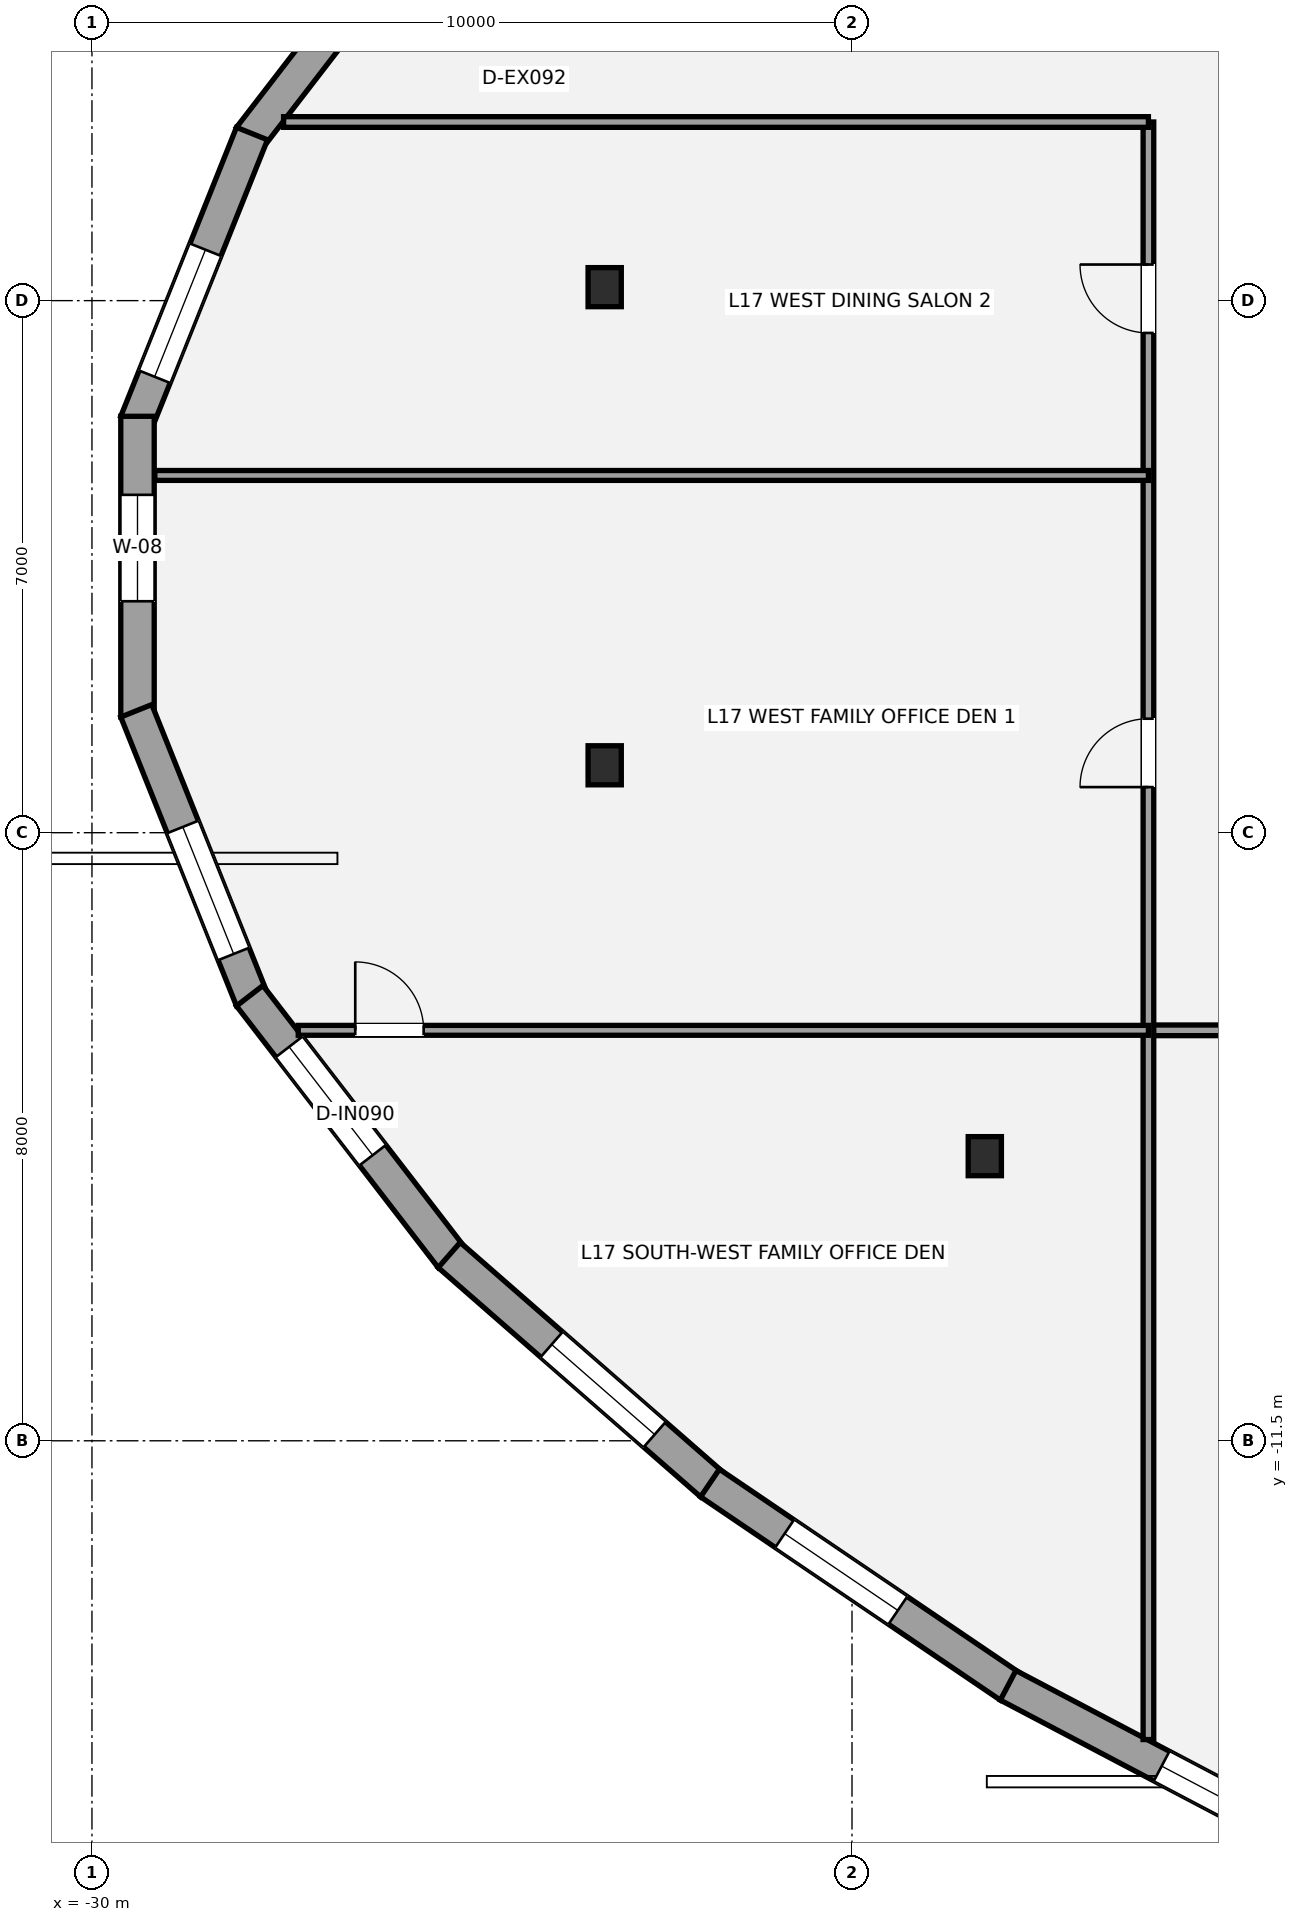
"""IFC4 building model, lengths in metres.
Left out: names, types, materials, properties, quantities, classifications, styles, units other than length and angle.
Written with IfcOpenShell. Run it as: python <this file> out.ifc"""

import sys

from ifc_helpers import new_model, si_unit, direction, frame, frame_2d, origin, origin_2d, place, context, subcontext, project, spatial, rectangle, i_section, extrude, element, fill, save


model = new_model("IFC4")
c1 = context("Model", 3, precision=1e-05, world=origin(), true_north=direction((0.0, 1.0)))
c2 = subcontext(c1, "Body", "Model", "MODEL_VIEW")
j1 = project(units=[si_unit("LENGTHUNIT", "METRE"), si_unit("PLANEANGLEUNIT", "RADIAN")], contexts=[c1])
p1 = place(None, origin())
s1 = spatial("IfcSite", under=j1, at=p1, CompositionType="ELEMENT")
p2 = place(p1, origin())
s2 = spatial("IfcBuilding", under=s1, at=p2, CompositionType="ELEMENT")
p3 = place(p2, frame((0.0, 0.0, 66.6)))
s3 = spatial("IfcBuildingStorey", under=s2, at=p3, CompositionType="ELEMENT", Elevation=66.6)
for number, where, z_axis, x_axis in (
    (1, (-23.254, 3.677, 0.0), (0.0, 0.0, 1.0), (1.0, 0.0, 0.0)),
    (2, (-23.254, -2.613, 0.0), (0.0, 0.0, 1.0), (1.0, 0.0, 0.0)),
    (3, (-18.253, -7.756, 0.0), (0.0, 0.0, 1.0), (1.0, 0.0, 0.0)),
):
    element("IfcColumn", number, at=place(p3, frame(where, z_axis=z_axis, x_axis=x_axis)), inside=s3, PredefinedType="COLUMN", context=c2, shape_type="SweptSolid", body=[
        extrude(i_section(OverallWidth=0.437, OverallDepth=0.514, WebThickness=0.061, FlangeThickness=0.097, at=origin_2d()), origin(), (0.0, 0.0, 1.0), 3.6),
    ])
p4 = place(p3, frame((-27.925, 5.645, 0.0), z_axis=(0.0, 0.0, 1.0), x_axis=(0.610684735824, 0.791873824187, 0.0)))
e4 = element("IfcWall", 4, at=p4, inside=s3, PredefinedType="STANDARD", context=c2, shape_type="SweptSolid", body=[
    extrude(rectangle(XDim=4.347, YDim=0.44, at=frame_2d((2.173, 0.0))), origin(), (0.0, 0.0, 1.0), 2.529),
])
p5 = place(p4, frame((2.647, 0.0, 0.65)))
e5 = element("IfcOpeningElement", 5, at=p5, cuts=e4, PredefinedType="OPENING", context=c2, shape_type="SweptSolid", body=[
    extrude(rectangle(XDim=1.5, YDim=1.7, at=frame_2d((0.75, 0.85))), frame((0.0, 0.23, 0.0), z_axis=(0.0, -1.0, 0.0), x_axis=(1.0, 0.0, 0.0)), (0.0, 0.0, 1.0), 0.46),
])
p6 = place(p3, frame((-29.417, 1.896, 0.0), z_axis=(0.0, 0.0, 1.0), x_axis=(0.37175044344, 0.928332703185, 0.0)))
e6 = element("IfcWall", 6, at=p6, inside=s3, PredefinedType="STANDARD", context=c2, shape_type="SweptSolid", body=[
    extrude(rectangle(XDim=4.095, YDim=0.44, at=frame_2d((2.047, 0.0))), origin(), (0.0, 0.0, 1.0), 2.529),
])
p7 = place(p6, frame((0.649, 0.0, 0.65)))
e7 = element("IfcOpeningElement", 7, at=p7, cuts=e6, PredefinedType="OPENING", context=c2, shape_type="SweptSolid", body=[
    extrude(rectangle(XDim=1.8, YDim=1.7, at=frame_2d((0.9, 0.85))), frame((0.0, 0.23, 0.0), z_axis=(0.0, -1.0, 0.0), x_axis=(1.0, 0.0, 0.0)), (0.0, 0.0, 1.0), 0.46),
])
p8 = place(p3, frame((-29.401, -1.978, 0.0), z_axis=(0.0, 0.0, 1.0), x_axis=(0.0, 1.0, 0.0)))
e8 = element("IfcWall", 8, at=p8, inside=s3, PredefinedType="STANDARD", context=c2, shape_type="SweptSolid", body=[
    extrude(rectangle(XDim=3.957, YDim=0.44, at=frame_2d((1.978, 0.0))), origin(), (0.0, 0.0, 1.0), 2.533),
])
p9 = place(p8, frame((1.523, 0.0, 0.85)))
e9 = element("IfcOpeningElement", 9, at=p9, cuts=e8, PredefinedType="OPENING", context=c2, shape_type="SweptSolid", body=[
    extrude(rectangle(XDim=1.4, YDim=1.55, at=frame_2d((0.7, 0.775))), frame((0.0, 0.23, 0.0), z_axis=(0.0, -1.0, 0.0), x_axis=(1.0, 0.0, 0.0)), (0.0, 0.0, 1.0), 0.46),
])
p10 = place(p3, frame((-27.895, -5.698, 0.0), z_axis=(0.0, 0.0, 1.0), x_axis=(-0.37175044344, 0.928332703185, 0.0)))
e10 = element("IfcWall", 10, at=p10, inside=s3, PredefinedType="STANDARD", context=c2, shape_type="SweptSolid", body=[
    extrude(rectangle(XDim=4.095, YDim=0.44, at=frame_2d((2.047, 0.0))), origin(), (0.0, 0.0, 1.0), 2.529),
])
p11 = place(p10, frame((0.649, 0.0, 0.65)))
e11 = element("IfcOpeningElement", 11, at=p11, cuts=e10, PredefinedType="OPENING", context=c2, shape_type="SweptSolid", body=[
    extrude(rectangle(XDim=1.8, YDim=1.7, at=frame_2d((0.9, 0.85))), frame((0.0, 0.23, 0.0), z_axis=(0.0, -1.0, 0.0), x_axis=(1.0, 0.0, 0.0)), (0.0, 0.0, 1.0), 0.46),
])
p12 = place(p3, frame((-25.27, -9.087, 0.0), z_axis=(0.0, 0.0, 1.0), x_axis=(-0.610684735824, 0.791873824187, 0.0)))
e12 = element("IfcWall", 12, at=p12, inside=s3, PredefinedType="STANDARD", context=c2, shape_type="SweptSolid", body=[
    extrude(rectangle(XDim=4.347, YDim=0.44, at=frame_2d((2.173, 0.0))), origin(), (0.0, 0.0, 1.0), 2.529),
])
p13 = place(p12, frame((1.698, 0.0, 0.65)))
e13 = element("IfcOpeningElement", 13, at=p13, cuts=e12, PredefinedType="OPENING", context=c2, shape_type="SweptSolid", body=[
    extrude(rectangle(XDim=1.8, YDim=1.7, at=frame_2d((0.9, 0.85))), frame((0.0, 0.23, 0.0), z_axis=(0.0, -1.0, 0.0), x_axis=(1.0, 0.0, 0.0)), (0.0, 0.0, 1.0), 0.46),
])
p14 = place(p3, frame((-21.847, -12.072, 0.0), z_axis=(0.0, 0.0, 1.0), x_axis=(-0.753064762529, 0.657946398605, 0.0)))
e14 = element("IfcWall", 14, at=p14, inside=s3, PredefinedType="STANDARD", context=c2, shape_type="SweptSolid", body=[
    extrude(rectangle(XDim=4.584, YDim=0.44, at=frame_2d((2.292, 0.0))), origin(), (0.0, 0.0, 1.0), 2.529),
])
p15 = place(p14, frame((0.995, 0.0, 0.65)))
e15 = element("IfcOpeningElement", 15, at=p15, cuts=e14, PredefinedType="OPENING", context=c2, shape_type="SweptSolid", body=[
    extrude(rectangle(XDim=1.8, YDim=1.7, at=frame_2d((0.9, 0.85))), frame((0.0, 0.23, 0.0), z_axis=(0.0, -1.0, 0.0), x_axis=(1.0, 0.0, 0.0)), (0.0, 0.0, 1.0), 0.46),
])
p16 = place(p3, frame((-17.925, -14.729, 0.0), z_axis=(0.0, 0.0, 1.0), x_axis=(-0.827689135004, 0.561186863528, 0.0)))
e16 = element("IfcWall", 16, at=p16, inside=s3, PredefinedType="STANDARD", context=c2, shape_type="SweptSolid", body=[
    extrude(rectangle(XDim=4.765, YDim=0.44, at=frame_2d((2.382, 0.0))), origin(), (0.0, 0.0, 1.0), 2.529),
])
p17 = place(p16, frame((1.778, 0.0, 0.65)))
e17 = element("IfcOpeningElement", 17, at=p17, cuts=e16, PredefinedType="OPENING", context=c2, shape_type="SweptSolid", body=[
    extrude(rectangle(XDim=1.8, YDim=1.7, at=frame_2d((0.9, 0.85))), frame((0.0, 0.23, 0.0), z_axis=(0.0, -1.0, 0.0), x_axis=(1.0, 0.0, 0.0)), (0.0, 0.0, 1.0), 0.46),
])
p18 = place(p3, frame((-13.498, -17.058, 0.0), z_axis=(0.0, 0.0, 1.0), x_axis=(-0.884937186938, 0.465710398395, 0.0)))
e18 = element("IfcWall", 18, at=p18, inside=s3, PredefinedType="STANDARD", context=c2, shape_type="SweptSolid", body=[
    extrude(rectangle(XDim=5.026, YDim=0.44, at=frame_2d((2.513, 0.0))), origin(), (0.0, 0.0, 1.0), 2.529),
])
p19 = place(p18, frame((0.944, 0.0, 0.65)))
e19 = element("IfcOpeningElement", 19, at=p19, cuts=e18, PredefinedType="OPENING", context=c2, shape_type="SweptSolid", body=[
    extrude(rectangle(XDim=1.8, YDim=1.7, at=frame_2d((0.9, 0.85))), frame((0.0, 0.23, 0.0), z_axis=(0.0, -1.0, 0.0), x_axis=(1.0, 0.0, 0.0)), (0.0, 0.0, 1.0), 0.46),
])
p20 = place(p3, frame((-16.1, -6.1, 0.0), z_axis=(0.0, 0.0, 1.0), x_axis=(1.0, 0.0, 0.0)))
e20 = element("IfcWall", 20, at=p20, inside=s3, PredefinedType="PARTITIONING", context=c2, shape_type="SweptSolid", body=[
    extrude(rectangle(XDim=34.7, YDim=0.14, at=frame_2d((17.35, 0.0))), origin(), (0.0, 0.0, 1.0), 2.853),
])
p21 = place(p20, frame((8.1, 0.0, 0.0)))
e21 = element("IfcOpeningElement", 21, at=p21, cuts=e20, PredefinedType="OPENING", context=c2, shape_type="SweptSolid", body=[
    extrude(rectangle(XDim=0.9, YDim=2.1, at=frame_2d((0.45, 1.05))), frame((0.0, 0.08, 0.0), z_axis=(0.0, -1.0, 0.0), x_axis=(1.0, 0.0, 0.0)), (0.0, 0.0, 1.0), 0.16),
])
p22 = place(p20, frame((25.45, 0.0, 0.0)))
e22 = element("IfcOpeningElement", 22, at=p22, cuts=e20, PredefinedType="OPENING", context=c2, shape_type="SweptSolid", body=[
    extrude(rectangle(XDim=0.9, YDim=2.1, at=frame_2d((0.45, 1.05))), frame((0.0, 0.08, 0.0), z_axis=(0.0, -1.0, 0.0), x_axis=(1.0, 0.0, 0.0)), (0.0, 0.0, 1.0), 0.16),
])
p23 = place(p3, frame((-16.1, -15.431, 0.0), z_axis=(0.0, 0.0, 1.0), x_axis=(0.0, 1.0, 0.0)))
e23 = element("IfcWall", 23, at=p23, inside=s3, PredefinedType="PARTITIONING", context=c2, shape_type="SweptSolid", body=[
    extrude(rectangle(XDim=21.281, YDim=0.14, at=frame_2d((10.641, 0.0))), origin(), (0.0, 0.0, 1.0), 2.841),
])
p24 = place(p23, frame((12.531, 0.0, 0.0)))
e24 = element("IfcOpeningElement", 24, at=p24, cuts=e23, PredefinedType="OPENING", context=c2, shape_type="SweptSolid", body=[
    extrude(rectangle(XDim=0.9, YDim=2.1, at=frame_2d((0.45, 1.05))), frame((0.0, 0.08, 0.0), z_axis=(0.0, -1.0, 0.0), x_axis=(1.0, 0.0, 0.0)), (0.0, 0.0, 1.0), 0.16),
])
p25 = place(p23, frame((18.506, 0.0, 0.0)))
e25 = element("IfcOpeningElement", 25, at=p25, cuts=e23, PredefinedType="OPENING", context=c2, shape_type="SweptSolid", body=[
    extrude(rectangle(XDim=0.9, YDim=2.1, at=frame_2d((0.45, 1.05))), frame((0.0, 0.08, 0.0), z_axis=(0.0, -1.0, 0.0), x_axis=(1.0, 0.0, 0.0)), (0.0, 0.0, 1.0), 0.16),
])
p26 = place(p3, frame((-27.479, 5.85, 0.0), z_axis=(0.0, 0.0, 1.0), x_axis=(1.0, 0.0, 0.0)))
e26 = element("IfcWall", 26, at=p26, inside=s3, PredefinedType="PARTITIONING", context=c2, shape_type="SweptSolid", body=[
    extrude(rectangle(XDim=11.379, YDim=0.14, at=frame_2d((5.689, 0.0))), origin(), (0.0, 0.0, 1.0), 2.853),
])
p27 = place(p3, frame((-27.286, -6.1, 0.0), z_axis=(0.0, 0.0, 1.0), x_axis=(1.0, 0.0, 0.0)))
e27 = element("IfcWall", 27, at=p27, inside=s3, PredefinedType="PARTITIONING", context=c2, shape_type="SweptSolid", body=[
    extrude(rectangle(XDim=11.186, YDim=0.13, at=frame_2d((5.593, 0.0))), origin(), (0.0, 0.0, 1.0), 2.779),
])
p28 = place(p27, frame((0.75, 0.0, 0.0)))
e28 = element("IfcOpeningElement", 28, at=p28, cuts=e27, PredefinedType="OPENING", context=c2, shape_type="SweptSolid", body=[
    extrude(rectangle(XDim=0.9, YDim=2.1, at=frame_2d((0.45, 1.05))), frame((0.0, 0.075, 0.0), z_axis=(0.0, -1.0, 0.0), x_axis=(1.0, 0.0, 0.0)), (0.0, 0.0, 1.0), 0.15),
])
p29 = place(p3, frame((-29.173, 1.2, 0.0), z_axis=(0.0, 0.0, 1.0), x_axis=(1.0, 0.0, 0.0)))
e29 = element("IfcWall", 29, at=p29, inside=s3, PredefinedType="PARTITIONING", context=c2, shape_type="SweptSolid", body=[
    extrude(rectangle(XDim=13.073, YDim=0.13, at=frame_2d((6.536, 0.0))), origin(), (0.0, 0.0, 1.0), 2.853),
])
p30 = place(p7, origin())
e30 = element("IfcWindow", 30, at=p30, inside=s3, PartitioningType="SINGLE_PANEL", PredefinedType="WINDOW", context=c2, shape_type="SweptSolid", body=[
    extrude(rectangle(XDim=1.8, YDim=1.7, at=frame_2d((0.9, 0.85))), frame((0.0, -0.01, 0.0), z_axis=(0.0, -1.0, 0.0), x_axis=(1.0, 0.0, 0.0)), (0.0, 0.0, 1.0), 0.06),
])
fill(e7, e30)
p31 = place(p9, origin())
e31 = element("IfcWindow", 31, at=p31, inside=s3, PartitioningType="SINGLE_PANEL", PredefinedType="WINDOW", context=c2, shape_type="SweptSolid", body=[
    extrude(rectangle(XDim=1.4, YDim=1.55, at=frame_2d((0.7, 0.775))), frame((0.0, -0.01, 0.0), z_axis=(0.0, -1.0, 0.0), x_axis=(1.0, 0.0, 0.0)), (0.0, 0.0, 1.0), 0.06),
])
fill(e9, e31)
p32 = place(p11, origin())
e32 = element("IfcWindow", 32, at=p32, inside=s3, PartitioningType="SINGLE_PANEL", PredefinedType="WINDOW", context=c2, shape_type="SweptSolid", body=[
    extrude(rectangle(XDim=1.8, YDim=1.7, at=frame_2d((0.9, 0.85))), frame((0.0, -0.01, 0.0), z_axis=(0.0, -1.0, 0.0), x_axis=(1.0, 0.0, 0.0)), (0.0, 0.0, 1.0), 0.06),
])
fill(e11, e32)
p33 = place(p13, origin())
e33 = element("IfcWindow", 33, at=p33, inside=s3, PartitioningType="SINGLE_PANEL", PredefinedType="WINDOW", context=c2, shape_type="SweptSolid", body=[
    extrude(rectangle(XDim=1.8, YDim=1.7, at=frame_2d((0.9, 0.85))), frame((0.0, -0.01, 0.0), z_axis=(0.0, -1.0, 0.0), x_axis=(1.0, 0.0, 0.0)), (0.0, 0.0, 1.0), 0.06),
])
fill(e13, e33)
p34 = place(p15, origin())
e34 = element("IfcWindow", 34, at=p34, inside=s3, PartitioningType="SINGLE_PANEL", PredefinedType="WINDOW", context=c2, shape_type="SweptSolid", body=[
    extrude(rectangle(XDim=1.8, YDim=1.7, at=frame_2d((0.9, 0.85))), frame((0.0, -0.01, 0.0), z_axis=(0.0, -1.0, 0.0), x_axis=(1.0, 0.0, 0.0)), (0.0, 0.0, 1.0), 0.06),
])
fill(e15, e34)
p35 = place(p17, origin())
e35 = element("IfcWindow", 35, at=p35, inside=s3, PartitioningType="SINGLE_PANEL", PredefinedType="WINDOW", context=c2, shape_type="SweptSolid", body=[
    extrude(rectangle(XDim=1.8, YDim=1.7, at=frame_2d((0.9, 0.85))), frame((0.0, -0.01, 0.0), z_axis=(0.0, -1.0, 0.0), x_axis=(1.0, 0.0, 0.0)), (0.0, 0.0, 1.0), 0.06),
])
fill(e17, e35)
p36 = place(p19, origin())
e36 = element("IfcWindow", 36, at=p36, inside=s3, PartitioningType="SINGLE_PANEL", PredefinedType="WINDOW", context=c2, shape_type="SweptSolid", body=[
    extrude(rectangle(XDim=1.8, YDim=1.7, at=frame_2d((0.9, 0.85))), frame((0.0, -0.01, 0.0), z_axis=(0.0, -1.0, 0.0), x_axis=(1.0, 0.0, 0.0)), (0.0, 0.0, 1.0), 0.06),
])
fill(e19, e36)
p37 = place(p28, origin())
e37 = element("IfcDoor", 37, at=p37, inside=s3, OperationType="SINGLE_SWING_LEFT", PredefinedType="DOOR", context=c2, shape_type="SweptSolid", body=[
    extrude(rectangle(XDim=0.9, YDim=2.1, at=frame_2d((0.45, 1.05))), frame((0.0, 0.025, 0.0), z_axis=(0.0, -1.0, 0.0), x_axis=(1.0, 0.0, 0.0)), (0.0, 0.0, 1.0), 0.05),
])
fill(e28, e37)
p38 = place(p24, origin())
e38 = element("IfcDoor", 38, at=p38, inside=s3, OperationType="SINGLE_SWING_LEFT", PredefinedType="DOOR", context=c2, shape_type="SweptSolid", body=[
    extrude(rectangle(XDim=0.9, YDim=2.1, at=frame_2d((0.45, 1.05))), frame((0.0, 0.025, 0.0), z_axis=(0.0, -1.0, 0.0), x_axis=(1.0, 0.0, 0.0)), (0.0, 0.0, 1.0), 0.05),
])
fill(e24, e38)
p39 = place(p25, origin())
e39 = element("IfcDoor", 39, at=p39, inside=s3, OperationType="SINGLE_SWING_RIGHT", PredefinedType="DOOR", context=c2, shape_type="SweptSolid", body=[
    extrude(rectangle(XDim=0.9, YDim=2.1, at=frame_2d((0.45, 1.05))), frame((0.0, 0.025, 0.0), z_axis=(0.0, -1.0, 0.0), x_axis=(1.0, 0.0, 0.0)), (0.0, 0.0, 1.0), 0.05),
])
fill(e25, e39)
save(model, sys.argv[1])
